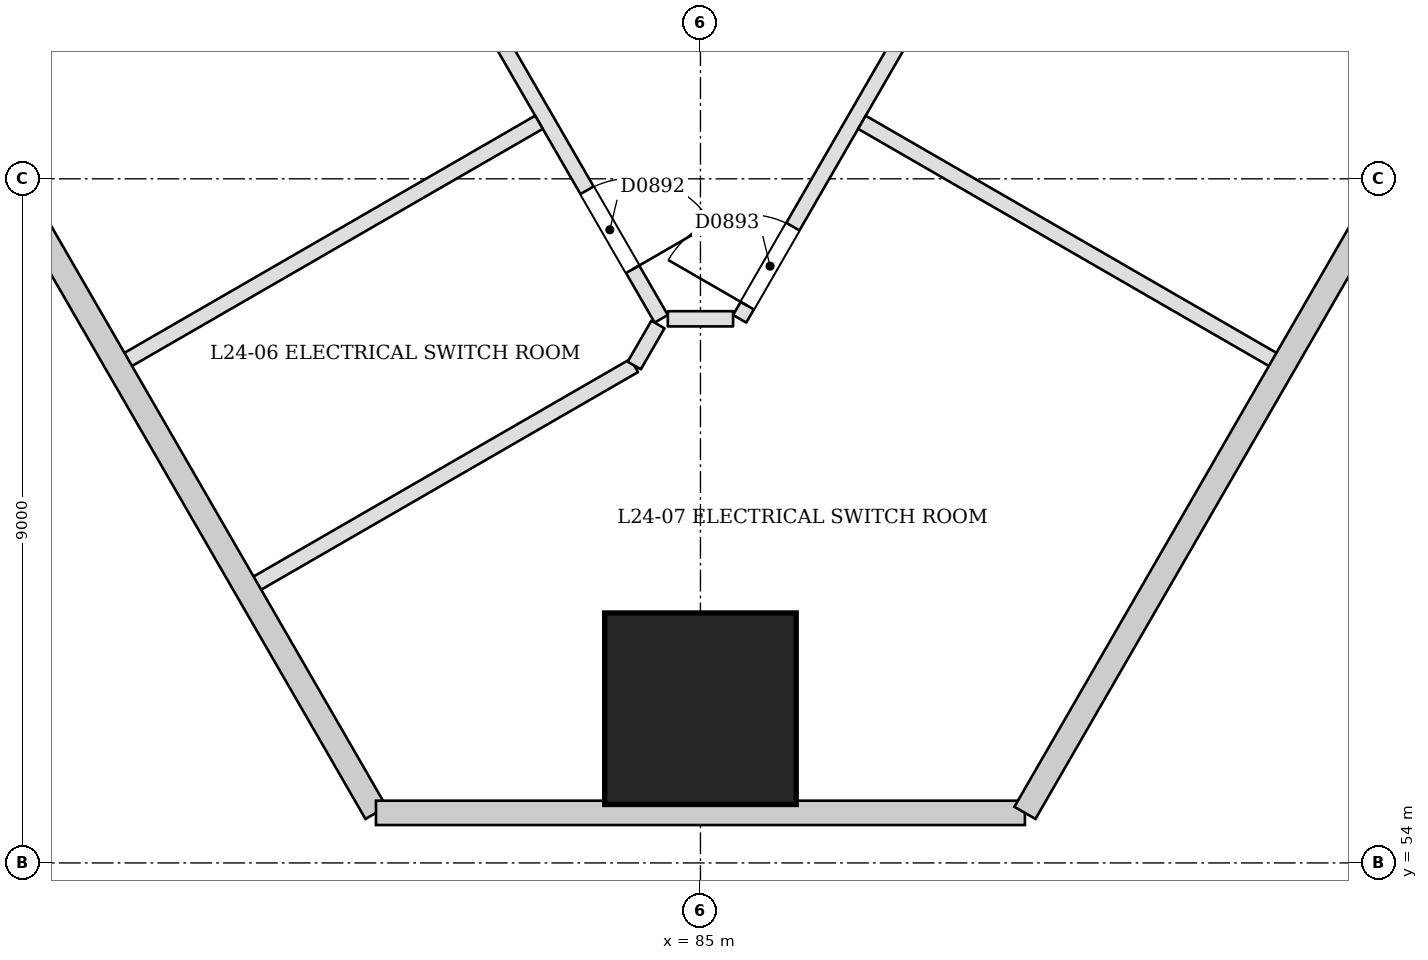
"""IFC4 building model, lengths in metres.
Left out: names, types, materials, properties, quantities, classifications, styles, units other than length and angle.
Written with IfcOpenShell. Run it as: python <this file> out.ifc"""

import sys

from ifc_helpers import new_model, si_unit, direction, frame, frame_2d, origin, origin_2d, place, context, subcontext, project, spatial, rectangle, extrude, element, fill, save


model = new_model("IFC4")
c1 = context("Model", 3, precision=1e-05, world=origin(), true_north=direction((0.0, 1.0)))
c2 = subcontext(c1, "Body", "Model", "MODEL_VIEW")
j1 = project(units=[si_unit("LENGTHUNIT", "METRE"), si_unit("PLANEANGLEUNIT", "RADIAN")], contexts=[c1])
p1 = place(None, origin())
s1 = spatial("IfcSite", under=j1, at=p1, CompositionType="ELEMENT")
p2 = place(p1, origin())
s2 = spatial("IfcBuilding", under=s1, at=p2, CompositionType="ELEMENT")
p3 = place(p2, frame((0.0, 0.0, 95.4)))
s3 = spatial("IfcBuildingStorey", under=s2, at=p3, CompositionType="ELEMENT", Elevation=95.4)
p4 = place(p3, frame((85.0, 55.958, 0.0), z_axis=(0.0, 0.058356907999, 0.998295783467), x_axis=(-1.0, 0.0, 0.0)))
e1 = element("IfcColumn", 1, at=p4, inside=s3, PredefinedType="COLUMN", context=c2, shape_type="SweptSolid", body=[
    extrude(rectangle(XDim=2.52, YDim=2.52, at=origin_2d()), origin(), (0.0, 0.0, 1.0), 5.409),
])
p5 = place(p3, frame((80.312, 68.384, 0.0), z_axis=(0.0, 0.0, 1.0), x_axis=(0.49998504917, -0.866034035478, 0.0)))
e2 = element("IfcWall", 2, at=p5, inside=s3, PredefinedType="PARTITIONING", context=c2, shape_type="SweptSolid", body=[
    extrude(rectangle(XDim=8.343, YDim=0.2, at=frame_2d((4.171, 0.0))), origin(), (0.0, 0.0, 1.0), 4.5),
])
p6 = place(p5, frame((1.299, 0.0, 0.0)))
e3 = element("IfcOpeningElement", 3, at=p6, cuts=e2, PredefinedType="OPENING", context=c2, shape_type="SweptSolid", body=[
    extrude(rectangle(XDim=1.2, YDim=2.4, at=frame_2d((0.6, 1.2))), frame((0.0, 0.11, 0.0), z_axis=(0.0, -1.0, 0.0), x_axis=(1.0, 0.0, 0.0)), (0.0, 0.0, 1.0), 0.221),
])
p7 = place(p5, frame((6.391, 0.0, 0.0)))
e4 = element("IfcOpeningElement", 4, at=p7, cuts=e2, PredefinedType="OPENING", context=c2, shape_type="SweptSolid", body=[
    extrude(rectangle(XDim=1.2, YDim=2.4, at=frame_2d((0.6, 1.2))), frame((0.0, 0.11, 0.0), z_axis=(0.0, -1.0, 0.0), x_axis=(1.0, 0.0, 0.0)), (0.0, 0.0, 1.0), 0.221),
])
p8 = place(p3, frame((84.571, 61.158, 0.0), z_axis=(0.0, 0.0, 1.0), x_axis=(1.0, 0.0, 0.0)))
e5 = element("IfcWall", 5, at=p8, inside=s3, PredefinedType="PARTITIONING", context=c2, shape_type="SweptSolid", body=[
    extrude(rectangle(XDim=0.859, YDim=0.2, at=frame_2d((0.429, 0.0))), origin(), (0.0, 0.0, 1.0), 4.9),
])
p9 = place(p3, frame((85.516, 61.158, 0.0), z_axis=(0.0, 0.0, 1.0), x_axis=(0.499997295205, 0.866026965393, 0.0)))
e6 = element("IfcWall", 6, at=p9, inside=s3, PredefinedType="PARTITIONING", context=c2, shape_type="SweptSolid", body=[
    extrude(rectangle(XDim=42.086, YDim=0.2, at=frame_2d((21.043, 0.0))), origin(), (0.0, 0.0, 1.0), 4.5),
])
p10 = place(p9, frame((0.2, 0.0, 0.0)))
e7 = element("IfcOpeningElement", 7, at=p10, cuts=e6, PredefinedType="OPENING", context=c2, shape_type="SweptSolid", body=[
    extrude(rectangle(XDim=1.2, YDim=2.4, at=frame_2d((0.6, 1.2))), frame((0.0, 0.11, 0.0), z_axis=(0.0, -1.0, 0.0), x_axis=(1.0, 0.0, 0.0)), (0.0, 0.0, 1.0), 0.221),
])
p11 = place(p9, frame((9.193, 0.0, 0.0)))
e8 = element("IfcOpeningElement", 8, at=p11, cuts=e6, PredefinedType="OPENING", context=c2, shape_type="SweptSolid", body=[
    extrude(rectangle(XDim=1.2, YDim=2.4, at=frame_2d((0.6, 1.2))), frame((0.0, 0.11, 0.0), z_axis=(0.0, -1.0, 0.0), x_axis=(1.0, 0.0, 0.0)), (0.0, 0.0, 1.0), 0.221),
])
p12 = place(p9, frame((20.443, 0.0, 0.0)))
e9 = element("IfcOpeningElement", 9, at=p12, cuts=e6, PredefinedType="OPENING", context=c2, shape_type="SweptSolid", body=[
    extrude(rectangle(XDim=1.2, YDim=2.4, at=frame_2d((0.6, 1.2))), frame((0.0, 0.11, 0.0), z_axis=(0.0, -1.0, 0.0), x_axis=(1.0, 0.0, 0.0)), (0.0, 0.0, 1.0), 0.221),
])
p13 = place(p9, frame((29.443, 0.0, 0.0)))
e10 = element("IfcOpeningElement", 10, at=p13, cuts=e6, PredefinedType="OPENING", context=c2, shape_type="SweptSolid", body=[
    extrude(rectangle(XDim=1.2, YDim=2.4, at=frame_2d((0.6, 1.2))), frame((0.0, 0.11, 0.0), z_axis=(0.0, -1.0, 0.0), x_axis=(1.0, 0.0, 0.0)), (0.0, 0.0, 1.0), 0.221),
])
p14 = place(p9, frame((40.184, 0.0, 0.0)))
e11 = element("IfcOpeningElement", 11, at=p14, cuts=e6, PredefinedType="OPENING", context=c2, shape_type="SweptSolid", body=[
    extrude(rectangle(XDim=1.2, YDim=2.4, at=frame_2d((0.6, 1.2))), frame((0.0, 0.11, 0.0), z_axis=(0.0, -1.0, 0.0), x_axis=(1.0, 0.0, 0.0)), (0.0, 0.0, 1.0), 0.221),
])
p15 = place(p3, frame((77.42, 60.594, 0.0), z_axis=(0.0, 0.0, 1.0), x_axis=(0.866026183513, 0.499998649469, 0.0)))
e12 = element("IfcWall", 12, at=p15, inside=s3, PredefinedType="PARTITIONING", context=c2, shape_type="SweptSolid", body=[
    extrude(rectangle(XDim=6.3, YDim=0.2, at=frame_2d((3.15, 0.0))), origin(), (0.0, 0.0, 1.0), 4.9),
])
p16 = place(p3, frame((79.119, 57.651, 0.0), z_axis=(0.0, 0.0, 1.0), x_axis=(0.866014115051, 0.500019552151, 0.0)))
e13 = element("IfcWall", 13, at=p16, inside=s3, PredefinedType="PARTITIONING", context=c2, shape_type="SweptSolid", body=[
    extrude(rectangle(XDim=5.785, YDim=0.2, at=frame_2d((2.893, 0.0))), origin(), (0.0, 0.0, 1.0), 4.9),
])
p17 = place(p3, frame((84.129, 60.544, 0.0), z_axis=(0.0, 0.0, 1.0), x_axis=(0.500016430238, 0.866015917575, 0.0)))
e14 = element("IfcWall", 14, at=p17, inside=s3, PredefinedType="PARTITIONING", context=c2, shape_type="SweptSolid", body=[
    extrude(rectangle(XDim=0.623, YDim=0.2, at=frame_2d((0.312, 0.0))), origin(), (0.0, 0.0, 1.0), 4.9),
])
p18 = place(p3, frame((92.58, 60.594, 0.0), z_axis=(0.0, 0.0, 1.0), x_axis=(-0.866026183513, 0.499998649469, 0.0)))
e15 = element("IfcWall", 15, at=p18, inside=s3, PredefinedType="PARTITIONING", context=c2, shape_type="SweptSolid", body=[
    extrude(rectangle(XDim=6.3, YDim=0.2, at=frame_2d((3.15, 0.0))), origin(), (0.0, 0.0, 1.0), 4.9),
])
p19 = place(p7, origin())
e16 = element("IfcDoor", 16, at=p19, inside=s3, OperationType="SINGLE_SWING_RIGHT", PredefinedType="NOTDEFINED", context=c2, shape_type="SweptSolid", body=[
    extrude(rectangle(XDim=1.2, YDim=2.4, at=frame_2d((0.6, 1.2))), frame((0.0, 0.025, 0.0), z_axis=(0.0, -1.0, 0.0), x_axis=(1.0, 0.0, 0.0)), (0.0, 0.0, 1.0), 0.05),
])
fill(e4, e16)
p20 = place(p10, origin())
e17 = element("IfcDoor", 17, at=p20, inside=s3, OperationType="SINGLE_SWING_LEFT", PredefinedType="NOTDEFINED", context=c2, shape_type="SweptSolid", body=[
    extrude(rectangle(XDim=1.2, YDim=2.4, at=frame_2d((0.6, 1.2))), frame((0.0, 0.025, 0.0), z_axis=(0.0, -1.0, 0.0), x_axis=(1.0, 0.0, 0.0)), (0.0, 0.0, 1.0), 0.05),
])
fill(e7, e17)
save(model, sys.argv[1])
